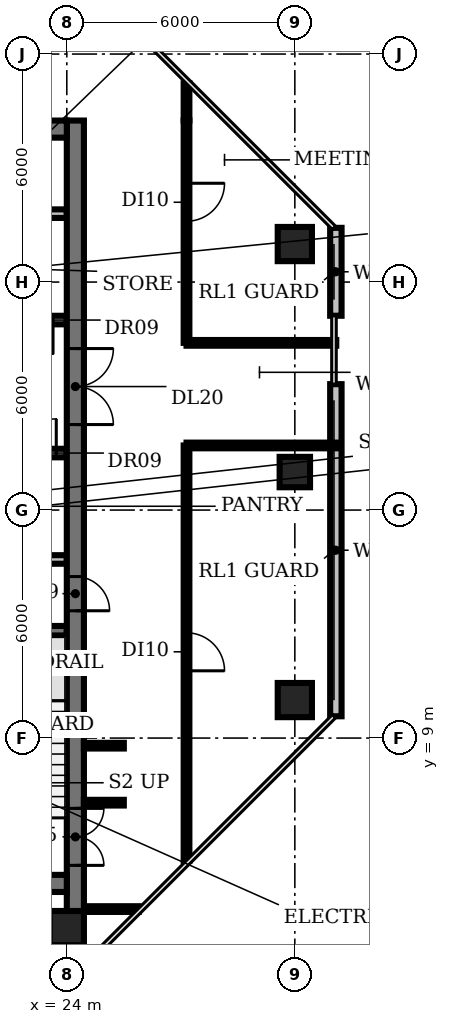
"""IFC4 building model, lengths in metres.
Left out: names, types, materials, properties, quantities, classifications, styles, units other than length and angle.
Written with IfcOpenShell. Run it as: python <this file> out.ifc"""

import sys

from ifc_helpers import new_model, si_unit, direction, frame, frame_2d, origin, origin_2d, place, context, subcontext, project, spatial, rectangle, circle, extrude, element, fill, save


model = new_model("IFC4")
c1 = context("Model", 3, precision=1e-05, world=origin(), true_north=direction((0.0, 1.0)))
c2 = subcontext(c1, "Body", "Model", "MODEL_VIEW")
j1 = project(units=[si_unit("LENGTHUNIT", "METRE"), si_unit("PLANEANGLEUNIT", "RADIAN")], contexts=[c1])
p1 = place(None, origin())
s1 = spatial("IfcSite", under=j1, at=p1, CompositionType="ELEMENT")
p2 = place(p1, origin())
s2 = spatial("IfcBuilding", under=s1, at=p2, CompositionType="ELEMENT")
p3 = place(p2, frame((0.0, 0.0, 239.0)))
s3 = spatial("IfcBuildingStorey", under=s2, at=p3, CompositionType="ELEMENT", Elevation=239.0)
for number, where, z_axis, x_axis in (
    (1, (24.0, 4.0, 0.0), (0.0, 0.0, 1.0), (1.0, 0.0, 0.0)),
    (2, (30.0, 10.0, 0.0), (0.0, 0.0, 1.0), (1.0, 0.0, 0.0)),
):
    element("IfcColumn", number, at=place(p3, frame(where, z_axis=z_axis, x_axis=x_axis)), inside=s3, PredefinedType="COLUMN", context=c2, shape_type="SweptSolid", body=[
        extrude(circle(Radius=0.45, at=origin_2d()), origin(), (0.0, 0.0, 1.0), 3.85),
    ])
p4 = place(p3, frame((30.0, 16.0, 0.0), z_axis=(0.0, 0.0, 1.0), x_axis=(1.0, 0.0, 0.0)))
e3 = element("IfcColumn", 3, at=p4, inside=s3, PredefinedType="COLUMN", context=c2, shape_type="SweptSolid", body=[
    extrude(rectangle(XDim=0.8, YDim=0.8, at=origin_2d()), origin(), (0.0, 0.0, 1.0), 3.85),
])
p5 = place(p3, frame((30.0, 22.0, 0.0), z_axis=(0.0, 0.0, 1.0), x_axis=(1.0, 0.0, 0.0)))
e4 = element("IfcColumn", 4, at=p5, inside=s3, PredefinedType="COLUMN", context=c2, shape_type="SweptSolid", body=[
    extrude(circle(Radius=0.45, at=origin_2d()), origin(), (0.0, 0.0, 1.0), 3.85),
])
p6 = place(p3, frame((31.08, 9.573, 0.0), z_axis=(0.0, 0.0, 1.0), x_axis=(0.0, 1.0, 0.0)))
e5 = element("IfcWall", 5, at=p6, inside=s3, PredefinedType="SOLIDWALL", context=c2, shape_type="SweptSolid", body=[
    extrude(rectangle(XDim=8.74, YDim=0.3, at=frame_2d((4.37, 0.0))), origin(), (0.0, 0.0, 1.0), 3.85),
])
p7 = place(p3, frame((31.08, 20.113, 0.0), z_axis=(0.0, 0.0, 1.0), x_axis=(0.0, 1.0, 0.0)))
e6 = element("IfcWall", 6, at=p7, inside=s3, PredefinedType="SOLIDWALL", context=c2, shape_type="SweptSolid", body=[
    extrude(rectangle(XDim=2.313, YDim=0.3, at=frame_2d((1.157, 0.0))), origin(), (0.0, 0.0, 1.0), 3.85),
])
p8 = place(p3, frame((20.85, 11.825, 0.0), z_axis=(0.0, 0.0, 1.0), x_axis=(1.0, 0.0, 0.0)))
e7 = element("IfcWall", 7, at=p8, inside=s3, PredefinedType="SHEAR", context=c2, shape_type="SweptSolid", body=[
    extrude(rectangle(XDim=3.15, YDim=0.25, at=frame_2d((1.575, 0.0))), origin(), (0.0, 0.0, 1.0), 3.85),
])
p9 = place(p3, frame((16.6, 13.7, 0.0), z_axis=(0.0, 0.0, 1.0), x_axis=(1.0, 0.0, 0.0)))
e8 = element("IfcWall", 8, at=p9, inside=s3, PredefinedType="PARTITIONING", context=c2, shape_type="SweptSolid", body=[
    extrude(rectangle(XDim=7.4, YDim=0.225, at=frame_2d((3.7, 0.0))), origin(), (0.0, 0.0, 1.0), 3.85),
])
p10 = place(p3, frame((9.4, 16.5, 0.0), z_axis=(0.0, 0.0, 1.0), x_axis=(1.0, 0.0, 0.0)))
e9 = element("IfcWall", 9, at=p10, inside=s3, PredefinedType="PARTITIONING", context=c2, shape_type="SweptSolid", body=[
    extrude(rectangle(XDim=14.6, YDim=0.225, at=frame_2d((7.3, 0.0))), origin(), (0.0, 0.0, 1.0), 3.85),
])
p11 = place(p10, frame((1.6, 0.0, 0.0)))
e10 = element("IfcOpeningElement", 10, at=p11, cuts=e9, PredefinedType="OPENING", context=c2, shape_type="SweptSolid", body=[
    extrude(rectangle(XDim=1.0, YDim=2.1, at=frame_2d((0.5, 1.05))), frame((0.0, 0.123, 0.0), z_axis=(0.0, -1.0, 0.0), x_axis=(1.0, 0.0, 0.0)), (0.0, 0.0, 1.0), 0.245),
])
p12 = place(p10, frame((5.125, 0.0, 0.0)))
e11 = element("IfcOpeningElement", 11, at=p12, cuts=e9, PredefinedType="OPENING", context=c2, shape_type="SweptSolid", body=[
    extrude(rectangle(XDim=0.9, YDim=2.1, at=frame_2d((0.45, 1.05))), frame((0.0, 0.123, 0.0), z_axis=(0.0, -1.0, 0.0), x_axis=(1.0, 0.0, 0.0)), (0.0, 0.0, 1.0), 0.245),
])
p13 = place(p10, frame((7.675, 0.0, 0.0)))
e12 = element("IfcOpeningElement", 12, at=p13, cuts=e9, PredefinedType="OPENING", context=c2, shape_type="SweptSolid", body=[
    extrude(rectangle(XDim=0.9, YDim=2.1, at=frame_2d((0.45, 1.05))), frame((0.0, 0.123, 0.0), z_axis=(0.0, -1.0, 0.0), x_axis=(1.0, 0.0, 0.0)), (0.0, 0.0, 1.0), 0.245),
])
p14 = place(p10, frame((9.775, 0.0, 0.0)))
e13 = element("IfcOpeningElement", 13, at=p14, cuts=e9, PredefinedType="OPENING", context=c2, shape_type="SweptSolid", body=[
    extrude(rectangle(XDim=0.9, YDim=2.1, at=frame_2d((0.45, 1.05))), frame((0.0, 0.123, 0.0), z_axis=(0.0, -1.0, 0.0), x_axis=(1.0, 0.0, 0.0)), (0.0, 0.0, 1.0), 0.245),
])
p15 = place(p10, frame((11.647, 0.0, 0.0)))
e14 = element("IfcOpeningElement", 14, at=p15, cuts=e9, PredefinedType="OPENING", context=c2, shape_type="SweptSolid", body=[
    extrude(rectangle(XDim=0.9, YDim=2.1, at=frame_2d((0.45, 1.05))), frame((0.0, 0.123, 0.0), z_axis=(0.0, -1.0, 0.0), x_axis=(1.0, 0.0, 0.0)), (0.0, 0.0, 1.0), 0.245),
])
p16 = place(p10, frame((13.423, 0.0, 0.0)))
e15 = element("IfcOpeningElement", 15, at=p16, cuts=e9, PredefinedType="OPENING", context=c2, shape_type="SweptSolid", body=[
    extrude(rectangle(XDim=0.9, YDim=2.1, at=frame_2d((0.45, 1.05))), frame((0.0, 0.123, 0.0), z_axis=(0.0, -1.0, 0.0), x_axis=(1.0, 0.0, 0.0)), (0.0, 0.0, 1.0), 0.245),
])
p17 = place(p3, frame((24.0, 20.0, 0.0), z_axis=(0.0, 0.0, 1.0), x_axis=(-1.0, 0.0, 0.0)))
e16 = element("IfcWall", 16, at=p17, inside=s3, PredefinedType="PARTITIONING", context=c2, shape_type="SweptSolid", body=[
    extrude(rectangle(XDim=14.6, YDim=0.225, at=frame_2d((7.3, 0.0))), origin(), (0.0, 0.0, 1.0), 3.85),
])
p18 = place(p17, frame((12.75, 0.0, 0.0)))
e17 = element("IfcOpeningElement", 17, at=p18, cuts=e16, PredefinedType="OPENING", context=c2, shape_type="SweptSolid", body=[
    extrude(rectangle(XDim=1.1, YDim=2.1, at=frame_2d((0.55, 1.05))), frame((0.0, 0.123, 0.0), z_axis=(0.0, -1.0, 0.0), x_axis=(1.0, 0.0, 0.0)), (0.0, 0.0, 1.0), 0.245),
])
p19 = place(p17, frame((9.95, 0.0, 0.0)))
e18 = element("IfcOpeningElement", 18, at=p19, cuts=e16, PredefinedType="OPENING", context=c2, shape_type="SweptSolid", body=[
    extrude(rectangle(XDim=1.1, YDim=2.1, at=frame_2d((0.55, 1.05))), frame((0.0, 0.123, 0.0), z_axis=(0.0, -1.0, 0.0), x_axis=(1.0, 0.0, 0.0)), (0.0, 0.0, 1.0), 0.245),
])
p20 = place(p17, frame((7.15, 0.0, 0.0)))
e19 = element("IfcOpeningElement", 19, at=p20, cuts=e16, PredefinedType="OPENING", context=c2, shape_type="SweptSolid", body=[
    extrude(rectangle(XDim=1.1, YDim=2.1, at=frame_2d((0.55, 1.05))), frame((0.0, 0.123, 0.0), z_axis=(0.0, -1.0, 0.0), x_axis=(1.0, 0.0, 0.0)), (0.0, 0.0, 1.0), 0.245),
])
p21 = place(p17, frame((4.35, 0.0, 0.0)))
e20 = element("IfcOpeningElement", 20, at=p21, cuts=e16, PredefinedType="OPENING", context=c2, shape_type="SweptSolid", body=[
    extrude(rectangle(XDim=1.1, YDim=2.1, at=frame_2d((0.55, 1.05))), frame((0.0, 0.123, 0.0), z_axis=(0.0, -1.0, 0.0), x_axis=(1.0, 0.0, 0.0)), (0.0, 0.0, 1.0), 0.245),
])
p22 = place(p17, frame((2.137, 0.0, 0.0)))
e21 = element("IfcOpeningElement", 21, at=p22, cuts=e16, PredefinedType="OPENING", context=c2, shape_type="SweptSolid", body=[
    extrude(rectangle(XDim=0.9, YDim=2.1, at=frame_2d((0.45, 1.05))), frame((0.0, 0.123, 0.0), z_axis=(0.0, -1.0, 0.0), x_axis=(1.0, 0.0, 0.0)), (0.0, 0.0, 1.0), 0.245),
])
p23 = place(p17, frame((0.363, 0.0, 0.0)))
e22 = element("IfcOpeningElement", 22, at=p23, cuts=e16, PredefinedType="OPENING", context=c2, shape_type="SweptSolid", body=[
    extrude(rectangle(XDim=0.9, YDim=2.1, at=frame_2d((0.45, 1.05))), frame((0.0, 0.123, 0.0), z_axis=(0.0, -1.0, 0.0), x_axis=(1.0, 0.0, 0.0)), (0.0, 0.0, 1.0), 0.245),
])
p24 = place(p3, frame((9.4, 22.8, 0.0), z_axis=(0.0, 0.0, 1.0), x_axis=(1.0, 0.0, 0.0)))
e23 = element("IfcWall", 23, at=p24, inside=s3, PredefinedType="PARTITIONING", context=c2, shape_type="SweptSolid", body=[
    extrude(rectangle(XDim=14.6, YDim=0.225, at=frame_2d((7.3, 0.0))), origin(), (0.0, 0.0, 1.0), 3.85),
])
p25 = place(p3, frame((24.225, 25.25, 0.0), z_axis=(0.0, 0.0, 1.0), x_axis=(0.0, -1.0, 0.0)))
e24 = element("IfcWall", 24, at=p25, inside=s3, PredefinedType="SHEAR", context=c2, shape_type="SweptSolid", body=[
    extrude(rectangle(XDim=20.83, YDim=0.45, at=frame_2d((10.415, 0.0))), origin(), (0.0, 0.0, 1.0), 3.85),
])
p26 = place(p25, frame((18.1, 0.0, 0.0)))
e25 = element("IfcOpeningElement", 25, at=p26, cuts=e24, PredefinedType="OPENING", context=c2, shape_type="SweptSolid", body=[
    extrude(rectangle(XDim=1.5, YDim=2.1, at=frame_2d((0.75, 1.05))), frame((0.0, 0.235, 0.0), z_axis=(0.0, -1.0, 0.0), x_axis=(1.0, 0.0, 0.0)), (0.0, 0.0, 1.0), 0.47),
])
p27 = place(p25, frame((12.0, 0.0, 0.0)))
e26 = element("IfcOpeningElement", 26, at=p27, cuts=e24, PredefinedType="OPENING", context=c2, shape_type="SweptSolid", body=[
    extrude(rectangle(XDim=0.9, YDim=2.1, at=frame_2d((0.45, 1.05))), frame((0.0, 0.235, 0.0), z_axis=(0.0, -1.0, 0.0), x_axis=(1.0, 0.0, 0.0)), (0.0, 0.0, 1.0), 0.47),
])
p28 = place(p25, frame((6.0, 0.0, 0.0)))
e27 = element("IfcOpeningElement", 27, at=p28, cuts=e24, PredefinedType="OPENING", context=c2, shape_type="SweptSolid", body=[
    extrude(rectangle(XDim=2.0, YDim=2.1, at=frame_2d((1.0, 1.05))), frame((0.0, 0.235, 0.0), z_axis=(0.0, -1.0, 0.0), x_axis=(1.0, 0.0, 0.0)), (0.0, 0.0, 1.0), 0.47),
])
p29 = place(p3, frame((24.0, 5.175, 0.0), z_axis=(0.0, 0.0, 1.0), x_axis=(-1.0, 0.0, 0.0)))
e28 = element("IfcWall", 28, at=p29, inside=s3, PredefinedType="SHEAR", context=c2, shape_type="SweptSolid", body=[
    extrude(rectangle(XDim=18.0, YDim=0.45, at=frame_2d((9.0, 0.0))), origin(), (0.0, 0.0, 1.0), 3.85),
])
p30 = place(p29, frame((0.825, 0.0, 0.0)))
e29 = element("IfcOpeningElement", 29, at=p30, cuts=e28, PredefinedType="OPENING", context=c2, shape_type="SweptSolid", body=[
    extrude(rectangle(XDim=1.5, YDim=2.1, at=frame_2d((0.75, 1.05))), frame((0.0, 0.235, 0.0), z_axis=(0.0, -1.0, 0.0), x_axis=(1.0, 0.0, 0.0)), (0.0, 0.0, 1.0), 0.47),
])
p31 = place(p29, frame((15.675, 0.0, 0.0)))
e30 = element("IfcOpeningElement", 30, at=p31, cuts=e28, PredefinedType="OPENING", context=c2, shape_type="SweptSolid", body=[
    extrude(rectangle(XDim=1.5, YDim=2.1, at=frame_2d((0.75, 1.05))), frame((0.0, 0.235, 0.0), z_axis=(0.0, -1.0, 0.0), x_axis=(1.0, 0.0, 0.0)), (0.0, 0.0, 1.0), 0.47),
])
p32 = place(p29, frame((13.0, 0.0, 0.0)))
e31 = element("IfcOpeningElement", 31, at=p32, cuts=e28, PredefinedType="OPENING", context=c2, shape_type="SweptSolid", body=[
    extrude(rectangle(XDim=1.2, YDim=2.1, at=frame_2d((0.6, 1.05))), frame((0.0, 0.235, 0.0), z_axis=(0.0, -1.0, 0.0), x_axis=(1.0, 0.0, 0.0)), (0.0, 0.0, 1.0), 0.47),
])
p33 = place(p29, frame((4.4, 0.0, 0.0)))
e32 = element("IfcOpeningElement", 32, at=p33, cuts=e28, PredefinedType="OPENING", context=c2, shape_type="SweptSolid", body=[
    extrude(rectangle(XDim=1.0, YDim=2.1, at=frame_2d((0.5, 1.05))), frame((0.0, 0.235, 0.0), z_axis=(0.0, -1.0, 0.0), x_axis=(1.0, 0.0, 0.0)), (0.0, 0.0, 1.0), 0.47),
])
p34 = place(p3, frame((6.0, 25.025, 0.0), z_axis=(0.0, 0.0, 1.0), x_axis=(1.0, 0.0, 0.0)))
e33 = element("IfcWall", 33, at=p34, inside=s3, PredefinedType="SHEAR", context=c2, shape_type="SweptSolid", body=[
    extrude(rectangle(XDim=18.0, YDim=0.45, at=frame_2d((9.0, 0.0))), origin(), (0.0, 0.0, 1.0), 3.85),
])
for number, where, z_axis, x_axis in (
    (34, (24.45, 7.3, 0.0), (0.0, 0.0, 1.0), (1.0, 0.0, 0.0)),
    (35, (24.45, 8.8, 0.0), (0.0, 0.0, 1.0), (1.0, 0.0, 0.0)),
):
    element("IfcWall", number, at=place(p3, frame(where, z_axis=z_axis, x_axis=x_axis)), inside=s3, PredefinedType="PARTITIONING", context=c2, shape_type="SweptSolid", body=[
        extrude(rectangle(XDim=1.05, YDim=0.15, at=frame_2d((0.525, 0.0))), origin(), (0.0, 0.0, 1.0), 2.88),
    ])
p35 = place(p3, frame((24.55, 4.5, 0.0), z_axis=(0.0, 0.0, 1.0), x_axis=(1.0, 0.0, 0.0)))
e36 = element("IfcWall", 36, at=p35, inside=s3, PredefinedType="PARTITIONING", context=c2, shape_type="SweptSolid", body=[
    extrude(rectangle(XDim=1.34, YDim=0.15, at=frame_2d((0.67, 0.0))), origin(), (0.0, 0.0, 1.0), 2.88),
])
p36 = place(p3, frame((27.15, 16.7, 0.0), z_axis=(0.0, 0.0, 1.0), x_axis=(0.0, -1.0, 0.0)))
e37 = element("IfcWall", 37, at=p36, inside=s3, PredefinedType="PARTITIONING", context=c2, shape_type="SweptSolid", body=[
    extrude(rectangle(XDim=10.93, YDim=0.15, at=frame_2d((5.465, 0.0))), origin(), (0.0, 0.0, 1.0), 2.88),
])
p37 = place(p36, frame((4.93, 0.0, 0.0)))
e38 = element("IfcOpeningElement", 38, at=p37, cuts=e37, PredefinedType="OPENING", context=c2, shape_type="SweptSolid", body=[
    extrude(rectangle(XDim=1.0, YDim=2.1, at=frame_2d((0.5, 1.05))), frame((0.0, 0.085, 0.0), z_axis=(0.0, -1.0, 0.0), x_axis=(1.0, 0.0, 0.0)), (0.0, 0.0, 1.0), 0.17),
])
for number, where, z_axis, x_axis in (
    (39, (27.15, 16.7, 0.0), (0.0, 0.0, 1.0), (1.0, 0.0, 0.0)),
    (40, (27.15, 19.4, 0.0), (0.0, 0.0, 1.0), (1.0, 0.0, 0.0)),
):
    element("IfcWall", number, at=place(p3, frame(where, z_axis=z_axis, x_axis=x_axis)), inside=s3, PredefinedType="PARTITIONING", context=c2, shape_type="SweptSolid", body=[
        extrude(rectangle(XDim=3.94, YDim=0.15, at=frame_2d((1.97, 0.0))), origin(), (0.0, 0.0, 1.0), 2.88),
    ])
p38 = place(p3, frame((27.15, 25.25, 0.0), z_axis=(0.0, 0.0, 1.0), x_axis=(0.0, -1.0, 0.0)))
e41 = element("IfcWall", 41, at=p38, inside=s3, PredefinedType="PARTITIONING", context=c2, shape_type="SweptSolid", body=[
    extrude(rectangle(XDim=5.85, YDim=0.15, at=frame_2d((2.925, 0.0))), origin(), (0.0, 0.0, 1.0), 2.88),
])
p39 = place(p38, frame((1.65, 0.0, 0.0)))
e42 = element("IfcOpeningElement", 42, at=p39, cuts=e41, PredefinedType="OPENING", context=c2, shape_type="SweptSolid", body=[
    extrude(rectangle(XDim=1.0, YDim=2.1, at=frame_2d((0.5, 1.05))), frame((0.0, 0.085, 0.0), z_axis=(0.0, -1.0, 0.0), x_axis=(1.0, 0.0, 0.0)), (0.0, 0.0, 1.0), 0.17),
])
p40 = place(p3, frame((27.15, 25.25, 0.0), z_axis=(0.0, 0.0, 1.0), x_axis=(0.0, 1.0, 0.0)))
e43 = element("IfcWall", 43, at=p40, inside=s3, PredefinedType="PARTITIONING", context=c2, shape_type="SweptSolid", body=[
    extrude(rectangle(XDim=0.98, YDim=0.15, at=frame_2d((0.49, 0.0))), origin(), (0.0, 0.0, 1.0), 2.88),
])
p41 = place(p16, origin())
e44 = element("IfcDoor", 44, at=p41, inside=s3, OperationType="SINGLE_SWING_RIGHT", PredefinedType="DOOR", context=c2, shape_type="SweptSolid", body=[
    extrude(rectangle(XDim=0.9, YDim=2.1, at=frame_2d((0.45, 1.05))), frame((0.0, 0.025, 0.0), z_axis=(0.0, -1.0, 0.0), x_axis=(1.0, 0.0, 0.0)), (0.0, 0.0, 1.0), 0.05),
])
fill(e15, e44)
p42 = place(p23, origin())
e45 = element("IfcDoor", 45, at=p42, inside=s3, OperationType="SINGLE_SWING_LEFT", PredefinedType="DOOR", context=c2, shape_type="SweptSolid", body=[
    extrude(rectangle(XDim=0.9, YDim=2.1, at=frame_2d((0.45, 1.05))), frame((0.0, 0.025, 0.0), z_axis=(0.0, -1.0, 0.0), x_axis=(1.0, 0.0, 0.0)), (0.0, 0.0, 1.0), 0.05),
])
fill(e22, e45)
p43 = place(p26, origin())
e46 = element("IfcDoor", 46, at=p43, inside=s3, OperationType="DOUBLE_DOOR_SINGLE_SWING", PredefinedType="DOOR", context=c2, shape_type="SweptSolid", body=[
    extrude(rectangle(XDim=1.5, YDim=2.1, at=frame_2d((0.75, 1.05))), frame((0.0, 0.025, 0.0), z_axis=(0.0, -1.0, 0.0), x_axis=(1.0, 0.0, 0.0)), (0.0, 0.0, 1.0), 0.05),
])
fill(e25, e46)
p44 = place(p27, origin())
e47 = element("IfcDoor", 47, at=p44, inside=s3, OperationType="SINGLE_SWING_RIGHT", PredefinedType="DOOR", context=c2, shape_type="SweptSolid", body=[
    extrude(rectangle(XDim=0.9, YDim=2.1, at=frame_2d((0.45, 1.05))), frame((0.0, 0.025, 0.0), z_axis=(0.0, -1.0, 0.0), x_axis=(1.0, 0.0, 0.0)), (0.0, 0.0, 1.0), 0.05),
])
fill(e26, e47)
p45 = place(p28, origin())
e48 = element("IfcDoor", 48, at=p45, inside=s3, OperationType="DOUBLE_DOOR_SINGLE_SWING", PredefinedType="DOOR", context=c2, shape_type="SweptSolid", body=[
    extrude(rectangle(XDim=2.0, YDim=2.1, at=frame_2d((1.0, 1.05))), frame((0.0, 0.025, 0.0), z_axis=(0.0, -1.0, 0.0), x_axis=(1.0, 0.0, 0.0)), (0.0, 0.0, 1.0), 0.05),
])
fill(e27, e48)
p46 = place(p37, origin())
e49 = element("IfcDoor", 49, at=p46, inside=s3, OperationType="SINGLE_SWING_RIGHT", PredefinedType="DOOR", context=c2, shape_type="SweptSolid", body=[
    extrude(rectangle(XDim=1.0, YDim=2.1, at=frame_2d((0.5, 1.05))), frame((0.0, 0.025, 0.0), z_axis=(0.0, -1.0, 0.0), x_axis=(1.0, 0.0, 0.0)), (0.0, 0.0, 1.0), 0.05),
])
fill(e38, e49)
p47 = place(p39, origin())
e50 = element("IfcDoor", 50, at=p47, inside=s3, OperationType="SINGLE_SWING_LEFT", PredefinedType="DOOR", context=c2, shape_type="SweptSolid", body=[
    extrude(rectangle(XDim=1.0, YDim=2.1, at=frame_2d((0.5, 1.05))), frame((0.0, 0.025, 0.0), z_axis=(0.0, -1.0, 0.0), x_axis=(1.0, 0.0, 0.0)), (0.0, 0.0, 1.0), 0.05),
])
fill(e42, e50)
save(model, sys.argv[1])
